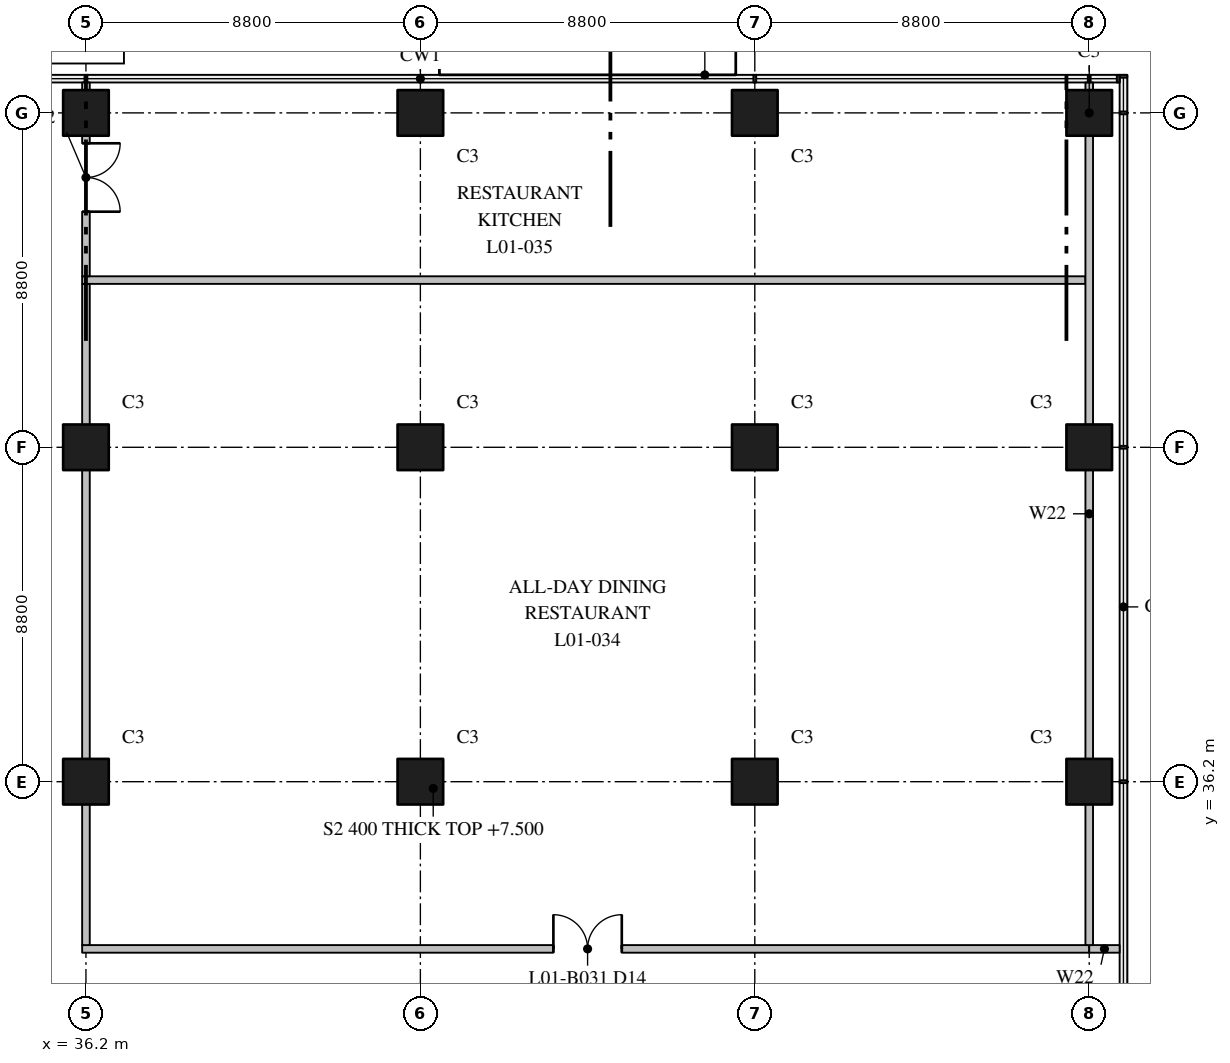
"""IFC4 building model, lengths in metres.
Left out: names, types, materials, properties, quantities, classifications, styles, units other than length and angle.
Written with IfcOpenShell. Run it as: python <this file> out.ifc"""

import sys

from ifc_helpers import new_model, si_unit, direction, frame, frame_2d, origin, origin_2d, place, context, subcontext, project, spatial, rectangle, extrude, element, fill, save


model = new_model("IFC4")
c1 = context("Model", 3, precision=1e-05, world=origin(), true_north=direction((0.0, 1.0)))
c2 = subcontext(c1, "Body", "Model", "MODEL_VIEW")
j1 = project(units=[si_unit("LENGTHUNIT", "METRE"), si_unit("PLANEANGLEUNIT", "RADIAN")], contexts=[c1])
p1 = place(None, origin())
s1 = spatial("IfcSite", under=j1, at=p1, CompositionType="ELEMENT")
p2 = place(p1, origin())
s2 = spatial("IfcBuilding", under=s1, at=p2, CompositionType="ELEMENT")
p3 = place(p2, frame((0.0, 0.0, 7.5)))
s3 = spatial("IfcBuildingStorey", under=s2, at=p3, CompositionType="ELEMENT", Elevation=7.5)
for number, where, z_axis, x_axis in (
    (1, (36.2, 36.2, 0.0), (0.0, 0.0, 1.0), (1.0, 0.0, 0.0)),
    (2, (36.2, 45.0, 0.0), (0.0, 0.0, 1.0), (1.0, 0.0, 0.0)),
    (3, (36.2, 53.8, 0.0), (0.0, 0.0, 1.0), (1.0, 0.0, 0.0)),
    (4, (45.0, 36.2, 0.0), (0.0, 0.0, 1.0), (1.0, 0.0, 0.0)),
    (5, (45.0, 45.0, 0.0), (0.0, 0.0, 1.0), (1.0, 0.0, 0.0)),
    (6, (45.0, 53.8, 0.0), (0.0, 0.0, 1.0), (1.0, 0.0, 0.0)),
    (7, (53.8, 36.2, 0.0), (0.0, 0.0, 1.0), (1.0, 0.0, 0.0)),
    (8, (53.8, 45.0, 0.0), (0.0, 0.0, 1.0), (1.0, 0.0, 0.0)),
    (9, (53.8, 53.8, 0.0), (0.0, 0.0, 1.0), (1.0, 0.0, 0.0)),
    (10, (62.6, 36.2, 0.0), (0.0, 0.0, 1.0), (1.0, 0.0, 0.0)),
    (11, (62.6, 45.0, 0.0), (0.0, 0.0, 1.0), (1.0, 0.0, 0.0)),
    (12, (62.6, 53.8, 0.0), (0.0, 0.0, 1.0), (1.0, 0.0, 0.0)),
):
    element("IfcColumn", number, at=place(p3, frame(where, z_axis=z_axis, x_axis=x_axis)), inside=s3, PredefinedType="COLUMN", context=c2, shape_type="SweptSolid", body=[
        extrude(rectangle(XDim=1.2, YDim=1.2, at=origin_2d()), origin(), (0.0, 0.0, 1.0), 5.5),
    ])
p4 = place(p3, frame((36.1, 31.8, 0.0), z_axis=(0.0, 0.0, 1.0), x_axis=(1.0, 0.0, 0.0)))
e13 = element("IfcWall", 13, at=p4, inside=s3, PredefinedType="PARTITIONING", context=c2, shape_type="SweptSolid", body=[
    extrude(rectangle(XDim=26.5, YDim=0.2, at=frame_2d((13.25, 0.0))), origin(), (0.0, 0.0, 1.0), 5.1),
])
p5 = place(p4, frame((12.4, 0.0, 0.0)))
e14 = element("IfcOpeningElement", 14, at=p5, cuts=e13, PredefinedType="OPENING", context=c2, shape_type="SweptSolid", body=[
    extrude(rectangle(XDim=1.8, YDim=2.4, at=frame_2d((0.9, 1.2))), frame((0.0, 0.11, 0.0), z_axis=(0.0, -1.0, 0.0), x_axis=(1.0, 0.0, 0.0)), (0.0, 0.0, 1.0), 0.22),
])
p6 = place(p3, frame((62.6, 31.8, 0.0), z_axis=(0.0, 0.0, 1.0), x_axis=(1.0, 0.0, 0.0)))
e15 = element("IfcWall", 15, at=p6, inside=s3, PredefinedType="PARTITIONING", context=c2, shape_type="SweptSolid", body=[
    extrude(rectangle(XDim=0.8, YDim=0.2, at=frame_2d((0.4, 0.0))), origin(), (0.0, 0.0, 1.0), 5.1),
])
p7 = place(p3, frame((36.1, 49.4, 0.0), z_axis=(0.0, 0.0, 1.0), x_axis=(1.0, 0.0, 0.0)))
e16 = element("IfcWall", 16, at=p7, inside=s3, PredefinedType="PARTITIONING", context=c2, shape_type="SweptSolid", body=[
    extrude(rectangle(XDim=26.4, YDim=0.2, at=frame_2d((13.2, 0.0))), origin(), (0.0, 0.0, 1.0), 5.1),
])
p8 = place(p3, frame((36.2, 31.9, 0.0), z_axis=(0.0, 0.0, 1.0), x_axis=(0.0, 1.0, 0.0)))
e17 = element("IfcWall", 17, at=p8, inside=s3, PredefinedType="PARTITIONING", context=c2, shape_type="SweptSolid", body=[
    extrude(rectangle(XDim=17.4, YDim=0.2, at=frame_2d((8.7, 0.0))), origin(), (0.0, 0.0, 1.0), 5.1),
])
p9 = place(p3, frame((36.2, 49.5, 0.0), z_axis=(0.0, 0.0, 1.0), x_axis=(0.0, 1.0, 0.0)))
e18 = element("IfcWall", 18, at=p9, inside=s3, PredefinedType="PARTITIONING", context=c2, shape_type="SweptSolid", body=[
    extrude(rectangle(XDim=5.1, YDim=0.2, at=frame_2d((2.55, 0.0))), origin(), (0.0, 0.0, 1.0), 5.1),
])
p10 = place(p9, frame((1.7, 0.0, 0.0)))
e19 = element("IfcOpeningElement", 19, at=p10, cuts=e18, PredefinedType="OPENING", context=c2, shape_type="SweptSolid", body=[
    extrude(rectangle(XDim=1.8, YDim=2.1, at=frame_2d((0.9, 1.05))), frame((0.0, 0.11, 0.0), z_axis=(0.0, -1.0, 0.0), x_axis=(1.0, 0.0, 0.0)), (0.0, 0.0, 1.0), 0.22),
])
p11 = place(p3, frame((62.6, 31.9, 0.0), z_axis=(0.0, 0.0, 1.0), x_axis=(0.0, 1.0, 0.0)))
e20 = element("IfcWall", 20, at=p11, inside=s3, PredefinedType="PARTITIONING", context=c2, shape_type="SweptSolid", body=[
    extrude(rectangle(XDim=22.7, YDim=0.2, at=frame_2d((11.35, 0.0))), origin(), (0.0, 0.0, 1.0), 5.1),
])
p12 = place(p5, origin())
e21 = element("IfcDoor", 21, at=p12, inside=s3, OperationType="DOUBLE_DOOR_SINGLE_SWING", PredefinedType="DOOR", context=c2, shape_type="SweptSolid", body=[
    extrude(rectangle(XDim=1.8, YDim=2.4, at=frame_2d((0.9, 1.2))), frame((0.0, 0.025, 0.0), z_axis=(0.0, -1.0, 0.0), x_axis=(1.0, 0.0, 0.0)), (0.0, 0.0, 1.0), 0.05),
])
fill(e14, e21)
p13 = place(p10, frame((1.8, 0.0, 0.0), z_axis=(0.0, 0.0, 1.0), x_axis=(-1.0, 0.0, 0.0)))
e22 = element("IfcDoor", 22, at=p13, inside=s3, OperationType="DOUBLE_DOOR_SINGLE_SWING", PredefinedType="DOOR", context=c2, shape_type="SweptSolid", body=[
    extrude(rectangle(XDim=1.8, YDim=2.1, at=frame_2d((0.9, 1.05))), frame((0.0, 0.025, 0.0), z_axis=(0.0, -1.0, 0.0), x_axis=(1.0, 0.0, 0.0)), (0.0, 0.0, 1.0), 0.05),
])
fill(e19, e22)
save(model, sys.argv[1])
